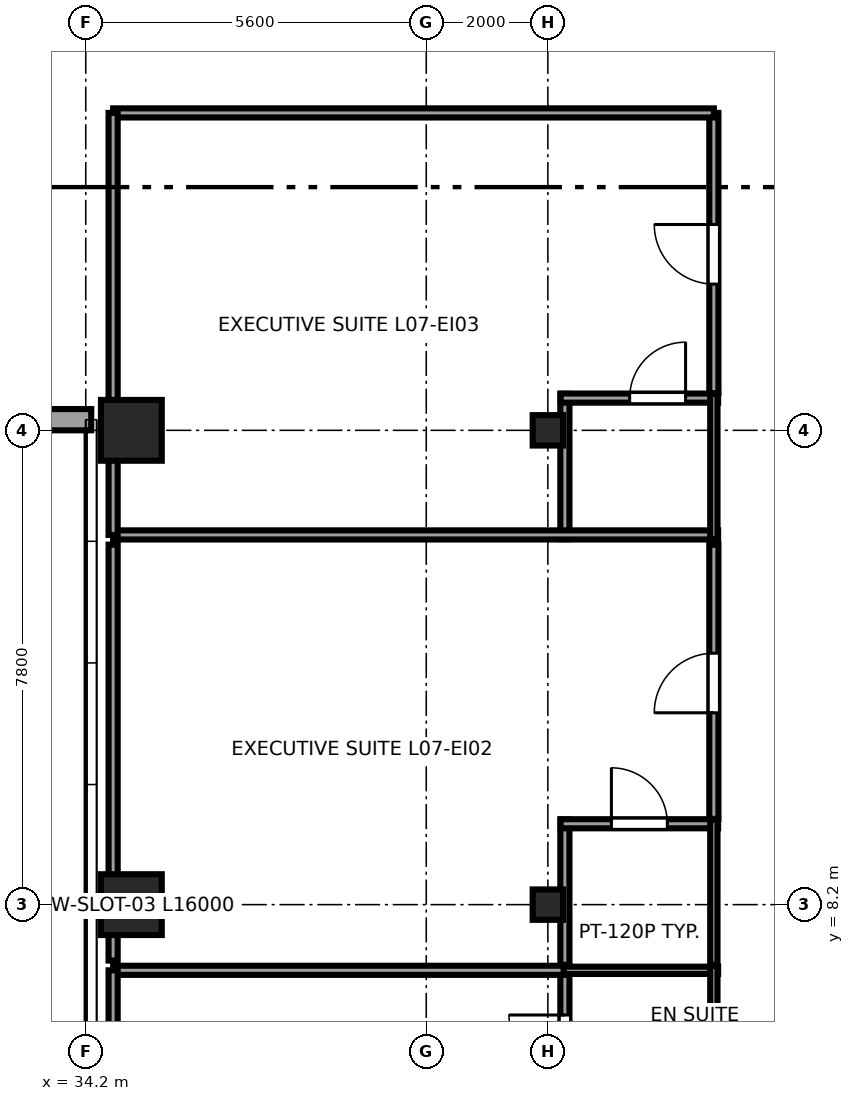
"""IFC4 building model, lengths in metres.
Left out: names, types, materials, properties, quantities, classifications, styles, units other than length and angle.
Written with IfcOpenShell. Run it as: python <this file> out.ifc"""

import sys

from ifc_helpers import new_model, si_unit, direction, frame, frame_2d, origin, origin_2d, place, context, subcontext, project, spatial, rectangle, i_section, extrude, source, transform, mapped, element, fill, save


model = new_model("IFC4")
c1 = context("Model", 3, precision=1e-05, world=origin(), true_north=direction((0.0, 1.0)))
c2 = subcontext(c1, "Body", "Model", "MODEL_VIEW")
j1 = project(units=[si_unit("LENGTHUNIT", "METRE"), si_unit("PLANEANGLEUNIT", "RADIAN")], contexts=[c1])
p1 = place(None, origin())
s1 = spatial("IfcSite", under=j1, at=p1, CompositionType="ELEMENT")
p2 = place(p1, origin())
s2 = spatial("IfcBuilding", under=s1, at=p2, CompositionType="ELEMENT")
p3 = place(p2, frame((0.0, 0.0, 35.55)))
s3 = spatial("IfcBuildingStorey", under=s2, at=p3, CompositionType="ELEMENT", Elevation=35.55)
m1 = source(origin(), c2, "Body", "SweptSolid", [
    extrude(rectangle(XDim=1.0, YDim=1.0, at=origin_2d()), origin(), (0.0, 0.0, 1.0), 3.55),
])
for number, where, z_axis, x_axis in (
    (1, (34.95, 8.2, 0.0), (0.0, 0.0, 1.0), (1.0, 0.0, 0.0)),
    (2, (34.95, 16.0, 0.0), (0.0, 0.0, 1.0), (1.0, 0.0, 0.0)),
):
    element("IfcColumn", number, at=place(p3, frame(where, z_axis=z_axis, x_axis=x_axis)), inside=s3, PredefinedType="COLUMN", context=c2, shape_type="MappedRepresentation", body=[
        mapped(m1, transform((0.0, 0.0, 0.0), x_axis=(1.0, 0.0, 0.0), y_axis=(0.0, 1.0, 0.0), z_axis=(0.0, 0.0, 1.0), scale=1.0)),
    ])
m2 = source(origin(), c2, "Body", "SweptSolid", [
    extrude(i_section(OverallWidth=0.5, OverallDepth=0.5, WebThickness=0.028, FlangeThickness=0.045, at=origin_2d()), origin(), (0.0, 0.0, 1.0), 3.55),
])
for number, where, z_axis, x_axis in (
    (3, (41.8, 8.2, 0.0), (0.0, 0.0, 1.0), (1.0, 0.0, 0.0)),
    (4, (41.8, 16.0, 0.0), (0.0, 0.0, 1.0), (1.0, 0.0, 0.0)),
):
    element("IfcColumn", number, at=place(p3, frame(where, z_axis=z_axis, x_axis=x_axis)), inside=s3, PredefinedType="COLUMN", context=c2, shape_type="MappedRepresentation", body=[
        mapped(m2, transform((0.0, 0.0, 0.0), x_axis=(1.0, 0.0, 0.0), y_axis=(0.0, 1.0, 0.0), z_axis=(0.0, 0.0, 1.0), scale=1.0)),
    ])
p4 = place(p3, frame((22.71, 16.175, 0.0), z_axis=(0.0, 0.0, 1.0), x_axis=(1.0, 0.0, 0.0)))
e5 = element("IfcWall", 5, at=p4, inside=s3, PredefinedType="SOLIDWALL", context=c2, shape_type="SweptSolid", body=[
    extrude(rectangle(XDim=11.58, YDim=0.35, at=frame_2d((5.79, 0.0))), origin(), (0.0, 0.0, 1.0), 2.748),
])
p5 = place(p4, frame((2.22, 0.0, 0.68)))
e6 = element("IfcOpeningElement", 6, at=p5, cuts=e5, PredefinedType="OPENING", context=c2, shape_type="SweptSolid", body=[
    extrude(rectangle(XDim=1.95, YDim=1.82, at=frame_2d((0.975, 0.91))), frame((0.0, 0.185, 0.0), z_axis=(0.0, -1.0, 0.0), x_axis=(1.0, 0.0, 0.0)), (0.0, 0.0, 1.0), 0.37),
])
p6 = place(p4, frame((7.41, 0.0, 0.68)))
e7 = element("IfcOpeningElement", 7, at=p6, cuts=e5, PredefinedType="OPENING", context=c2, shape_type="SweptSolid", body=[
    extrude(rectangle(XDim=1.95, YDim=1.82, at=frame_2d((0.975, 0.91))), frame((0.0, 0.185, 0.0), z_axis=(0.0, -1.0, 0.0), x_axis=(1.0, 0.0, 0.0)), (0.0, 0.0, 1.0), 0.37),
])
p7 = place(p3, frame((42.08, 4.8, 0.0), z_axis=(0.0, 0.0, 1.0), x_axis=(0.0, 1.0, 0.0)))
e8 = element("IfcWall", 8, at=p7, inside=s3, PredefinedType="PARTITIONING", context=c2, shape_type="SweptSolid", body=[
    extrude(rectangle(XDim=2.39, YDim=0.15, at=frame_2d((1.195, 0.0))), origin(), (0.0, 0.0, 1.0), 3.37),
])
p8 = place(p7, frame((0.665, 0.0, 0.0)))
e9 = element("IfcOpeningElement", 9, at=p8, cuts=e8, PredefinedType="OPENING", context=c2, shape_type="SweptSolid", body=[
    extrude(rectangle(XDim=0.92, YDim=2.01, at=frame_2d((0.46, 1.005))), frame((0.0, 0.085, 0.0), z_axis=(0.0, -1.0, 0.0), x_axis=(1.0, 0.0, 0.0)), (0.0, 0.0, 1.0), 0.17),
])
p9 = place(p3, frame((42.01, 7.12, 0.0), z_axis=(0.0, 0.0, 1.0), x_axis=(1.0, 0.0, 0.0)))
e10 = element("IfcWall", 10, at=p9, inside=s3, PredefinedType="PLUMBINGWALL", context=c2, shape_type="SweptSolid", body=[
    extrude(rectangle(XDim=2.59, YDim=0.12, at=frame_2d((1.295, 0.0))), origin(), (0.0, 0.0, 1.0), 3.37),
])
p10 = place(p3, frame((44.53, 4.8, 0.0), z_axis=(0.0, 0.0, 1.0), x_axis=(0.0, 1.0, 0.0)))
e11 = element("IfcWall", 11, at=p10, inside=s3, PredefinedType="PLUMBINGWALL", context=c2, shape_type="SweptSolid", body=[
    extrude(rectangle(XDim=2.39, YDim=0.12, at=frame_2d((1.195, 0.0))), origin(), (0.0, 0.0, 1.0), 3.37),
])
p11 = place(p3, frame((42.08, 7.21, 0.0), z_axis=(0.0, 0.0, 1.0), x_axis=(0.0, 1.0, 0.0)))
e12 = element("IfcWall", 12, at=p11, inside=s3, PredefinedType="PARTITIONING", context=c2, shape_type="SweptSolid", body=[
    extrude(rectangle(XDim=2.39, YDim=0.15, at=frame_2d((1.195, 0.0))), origin(), (0.0, 0.0, 1.0), 3.37),
])
p12 = place(p3, frame((42.01, 9.53, 0.0), z_axis=(0.0, 0.0, 1.0), x_axis=(1.0, 0.0, 0.0)))
e13 = element("IfcWall", 13, at=p12, inside=s3, PredefinedType="PARTITIONING", context=c2, shape_type="SweptSolid", body=[
    extrude(rectangle(XDim=2.59, YDim=0.15, at=frame_2d((1.295, 0.0))), origin(), (0.0, 0.0, 1.0), 3.37),
])
p13 = place(p12, frame((0.835, 0.0, 0.0)))
e14 = element("IfcOpeningElement", 14, at=p13, cuts=e13, PredefinedType="OPENING", context=c2, shape_type="SweptSolid", body=[
    extrude(rectangle(XDim=0.92, YDim=2.01, at=frame_2d((0.46, 1.005))), frame((0.0, 0.085, 0.0), z_axis=(0.0, -1.0, 0.0), x_axis=(1.0, 0.0, 0.0)), (0.0, 0.0, 1.0), 0.17),
])
p14 = place(p3, frame((44.53, 7.21, 0.0), z_axis=(0.0, 0.0, 1.0), x_axis=(0.0, 1.0, 0.0)))
e15 = element("IfcWall", 15, at=p14, inside=s3, PredefinedType="PLUMBINGWALL", context=c2, shape_type="SweptSolid", body=[
    extrude(rectangle(XDim=2.39, YDim=0.12, at=frame_2d((1.195, 0.0))), origin(), (0.0, 0.0, 1.0), 3.37),
])
p15 = place(p3, frame((42.08, 14.21, 0.0), z_axis=(0.0, 0.0, 1.0), x_axis=(0.0, 1.0, 0.0)))
e16 = element("IfcWall", 16, at=p15, inside=s3, PredefinedType="PARTITIONING", context=c2, shape_type="SweptSolid", body=[
    extrude(rectangle(XDim=2.39, YDim=0.15, at=frame_2d((1.195, 0.0))), origin(), (0.0, 0.0, 1.0), 3.37),
])
p16 = place(p3, frame((34.65, 14.28, 0.0), z_axis=(0.0, 0.0, 1.0), x_axis=(1.0, 0.0, 0.0)))
e17 = element("IfcWall", 17, at=p16, inside=s3, PredefinedType="PARTITIONING", context=c2, shape_type="SweptSolid", body=[
    extrude(rectangle(XDim=9.95, YDim=0.15, at=frame_2d((4.975, 0.0))), origin(), (0.0, 0.0, 1.0), 3.37),
])
p17 = place(p3, frame((42.01, 16.53, 0.0), z_axis=(0.0, 0.0, 1.0), x_axis=(1.0, 0.0, 0.0)))
e18 = element("IfcWall", 18, at=p17, inside=s3, PredefinedType="PARTITIONING", context=c2, shape_type="SweptSolid", body=[
    extrude(rectangle(XDim=2.59, YDim=0.15, at=frame_2d((1.295, 0.0))), origin(), (0.0, 0.0, 1.0), 3.37),
])
p18 = place(p17, frame((1.135, 0.0, 0.0)))
e19 = element("IfcOpeningElement", 19, at=p18, cuts=e18, PredefinedType="OPENING", context=c2, shape_type="SweptSolid", body=[
    extrude(rectangle(XDim=0.92, YDim=2.01, at=frame_2d((0.46, 1.005))), frame((0.0, 0.085, 0.0), z_axis=(0.0, -1.0, 0.0), x_axis=(1.0, 0.0, 0.0)), (0.0, 0.0, 1.0), 0.17),
])
p19 = place(p3, frame((44.53, 14.21, 0.0), z_axis=(0.0, 0.0, 1.0), x_axis=(0.0, 1.0, 0.0)))
e20 = element("IfcWall", 20, at=p19, inside=s3, PredefinedType="PLUMBINGWALL", context=c2, shape_type="SweptSolid", body=[
    extrude(rectangle(XDim=2.39, YDim=0.12, at=frame_2d((1.195, 0.0))), origin(), (0.0, 0.0, 1.0), 3.37),
])
p20 = place(p3, frame((34.65, 7.12, 0.0), z_axis=(0.0, 0.0, 1.0), x_axis=(1.0, 0.0, 0.0)))
e21 = element("IfcWall", 21, at=p20, inside=s3, PredefinedType="PARTITIONING", context=c2, shape_type="SweptSolid", body=[
    extrude(rectangle(XDim=7.41, YDim=0.15, at=frame_2d((3.705, 0.0))), origin(), (0.0, 0.0, 1.0), 3.37),
])
p21 = place(p3, frame((34.65, 0.405, 0.0), z_axis=(0.0, 0.0, 1.0), x_axis=(0.0, 1.0, 0.0)))
e22 = element("IfcWall", 22, at=p21, inside=s3, PredefinedType="PARTITIONING", context=c2, shape_type="SweptSolid", body=[
    extrude(rectangle(XDim=6.715, YDim=0.15, at=frame_2d((3.357, 0.0))), origin(), (0.0, 0.0, 1.0), 3.37),
])
p22 = place(p3, frame((44.53, 9.61, 0.0), z_axis=(0.0, 0.0, 1.0), x_axis=(0.0, 1.0, 0.0)))
e23 = element("IfcWall", 23, at=p22, inside=s3, PredefinedType="PARTITIONING", context=c2, shape_type="SweptSolid", body=[
    extrude(rectangle(XDim=4.51, YDim=0.15, at=frame_2d((2.255, 0.0))), origin(), (0.0, 0.0, 1.0), 3.37),
])
p23 = place(p22, frame((1.745, 0.0, 0.0)))
e24 = element("IfcOpeningElement", 24, at=p23, cuts=e23, PredefinedType="OPENING", context=c2, shape_type="SweptSolid", body=[
    extrude(rectangle(XDim=0.98, YDim=2.12, at=frame_2d((0.49, 1.06))), frame((0.0, 0.085, 0.0), z_axis=(0.0, -1.0, 0.0), x_axis=(1.0, 0.0, 0.0)), (0.0, 0.0, 1.0), 0.17),
])
p24 = place(p3, frame((34.65, 7.28, 0.0), z_axis=(0.0, 0.0, 1.0), x_axis=(0.0, 1.0, 0.0)))
e25 = element("IfcWall", 25, at=p24, inside=s3, PredefinedType="PARTITIONING", context=c2, shape_type="SweptSolid", body=[
    extrude(rectangle(XDim=6.84, YDim=0.15, at=frame_2d((3.42, 0.0))), origin(), (0.0, 0.0, 1.0), 3.37),
])
p25 = place(p3, frame((44.53, 16.61, 0.0), z_axis=(0.0, 0.0, 1.0), x_axis=(0.0, 1.0, 0.0)))
e26 = element("IfcWall", 26, at=p25, inside=s3, PredefinedType="PARTITIONING", context=c2, shape_type="SweptSolid", body=[
    extrude(rectangle(XDim=4.61, YDim=0.15, at=frame_2d((2.305, 0.0))), origin(), (0.0, 0.0, 1.0), 3.37),
])
p26 = place(p25, frame((1.795, 0.0, 0.0)))
e27 = element("IfcOpeningElement", 27, at=p26, cuts=e26, PredefinedType="OPENING", context=c2, shape_type="SweptSolid", body=[
    extrude(rectangle(XDim=0.98, YDim=2.12, at=frame_2d((0.49, 1.06))), frame((0.0, 0.085, 0.0), z_axis=(0.0, -1.0, 0.0), x_axis=(1.0, 0.0, 0.0)), (0.0, 0.0, 1.0), 0.17),
])
p27 = place(p3, frame((34.65, 21.22, 0.0), z_axis=(0.0, 0.0, 1.0), x_axis=(1.0, 0.0, 0.0)))
e28 = element("IfcWall", 28, at=p27, inside=s3, PredefinedType="PARTITIONING", context=c2, shape_type="SweptSolid", body=[
    extrude(rectangle(XDim=9.88, YDim=0.15, at=frame_2d((4.94, 0.0))), origin(), (0.0, 0.0, 1.0), 3.37),
])
p28 = place(p3, frame((34.65, 14.28, 0.0), z_axis=(0.0, 0.0, 1.0), x_axis=(0.0, 1.0, 0.0)))
e29 = element("IfcWall", 29, at=p28, inside=s3, PredefinedType="PARTITIONING", context=c2, shape_type="SweptSolid", body=[
    extrude(rectangle(XDim=6.94, YDim=0.15, at=frame_2d((3.47, 0.0))), origin(), (0.0, 0.0, 1.0), 3.37),
])
m3 = source(origin(), c2, "Body", "SweptSolid", [
    extrude(rectangle(XDim=0.92, YDim=2.01, at=frame_2d((0.46, 1.005))), frame((0.0, 0.025, 0.0), z_axis=(0.0, -1.0, 0.0), x_axis=(1.0, 0.0, 0.0)), (0.0, 0.0, 1.0), 0.05),
])
p29 = place(p8, origin())
e30 = element("IfcDoor", 30, at=p29, inside=s3, OperationType="SINGLE_SWING_RIGHT", PredefinedType="DOOR", context=c2, shape_type="MappedRepresentation", body=[
    mapped(m3, transform((0.0, 0.0, 0.0), x_axis=(1.0, 0.0, 0.0), y_axis=(0.0, 1.0, 0.0), z_axis=(0.0, 0.0, 1.0), scale=1.0)),
])
fill(e9, e30)
p30 = place(p13, origin())
e31 = element("IfcDoor", 31, at=p30, inside=s3, OperationType="SINGLE_SWING_LEFT", PredefinedType="DOOR", context=c2, shape_type="MappedRepresentation", body=[
    mapped(m3, transform((0.0, 0.0, 0.0), x_axis=(1.0, 0.0, 0.0), y_axis=(0.0, 1.0, 0.0), z_axis=(0.0, 0.0, 1.0), scale=1.0)),
])
fill(e14, e31)
p31 = place(p18, origin())
e32 = element("IfcDoor", 32, at=p31, inside=s3, OperationType="SINGLE_SWING_RIGHT", PredefinedType="DOOR", context=c2, shape_type="MappedRepresentation", body=[
    mapped(m3, transform((0.0, 0.0, 0.0), x_axis=(1.0, 0.0, 0.0), y_axis=(0.0, 1.0, 0.0), z_axis=(0.0, 0.0, 1.0), scale=1.0)),
])
fill(e19, e32)
m4 = source(origin(), c2, "Body", "SweptSolid", [
    extrude(rectangle(XDim=0.98, YDim=2.12, at=frame_2d((0.49, 1.06))), frame((0.0, 0.025, 0.0), z_axis=(0.0, -1.0, 0.0), x_axis=(1.0, 0.0, 0.0)), (0.0, 0.0, 1.0), 0.05),
])
p32 = place(p23, origin())
e33 = element("IfcDoor", 33, at=p32, inside=s3, OperationType="SINGLE_SWING_LEFT", PredefinedType="DOOR", context=c2, shape_type="MappedRepresentation", body=[
    mapped(m4, transform((0.0, 0.0, 0.0), x_axis=(1.0, 0.0, 0.0), y_axis=(0.0, 1.0, 0.0), z_axis=(0.0, 0.0, 1.0), scale=1.0)),
])
fill(e24, e33)
p33 = place(p26, origin())
e34 = element("IfcDoor", 34, at=p33, inside=s3, OperationType="SINGLE_SWING_RIGHT", PredefinedType="DOOR", context=c2, shape_type="MappedRepresentation", body=[
    mapped(m4, transform((0.0, 0.0, 0.0), x_axis=(1.0, 0.0, 0.0), y_axis=(0.0, 1.0, 0.0), z_axis=(0.0, 0.0, 1.0), scale=1.0)),
])
fill(e27, e34)
save(model, sys.argv[1])
